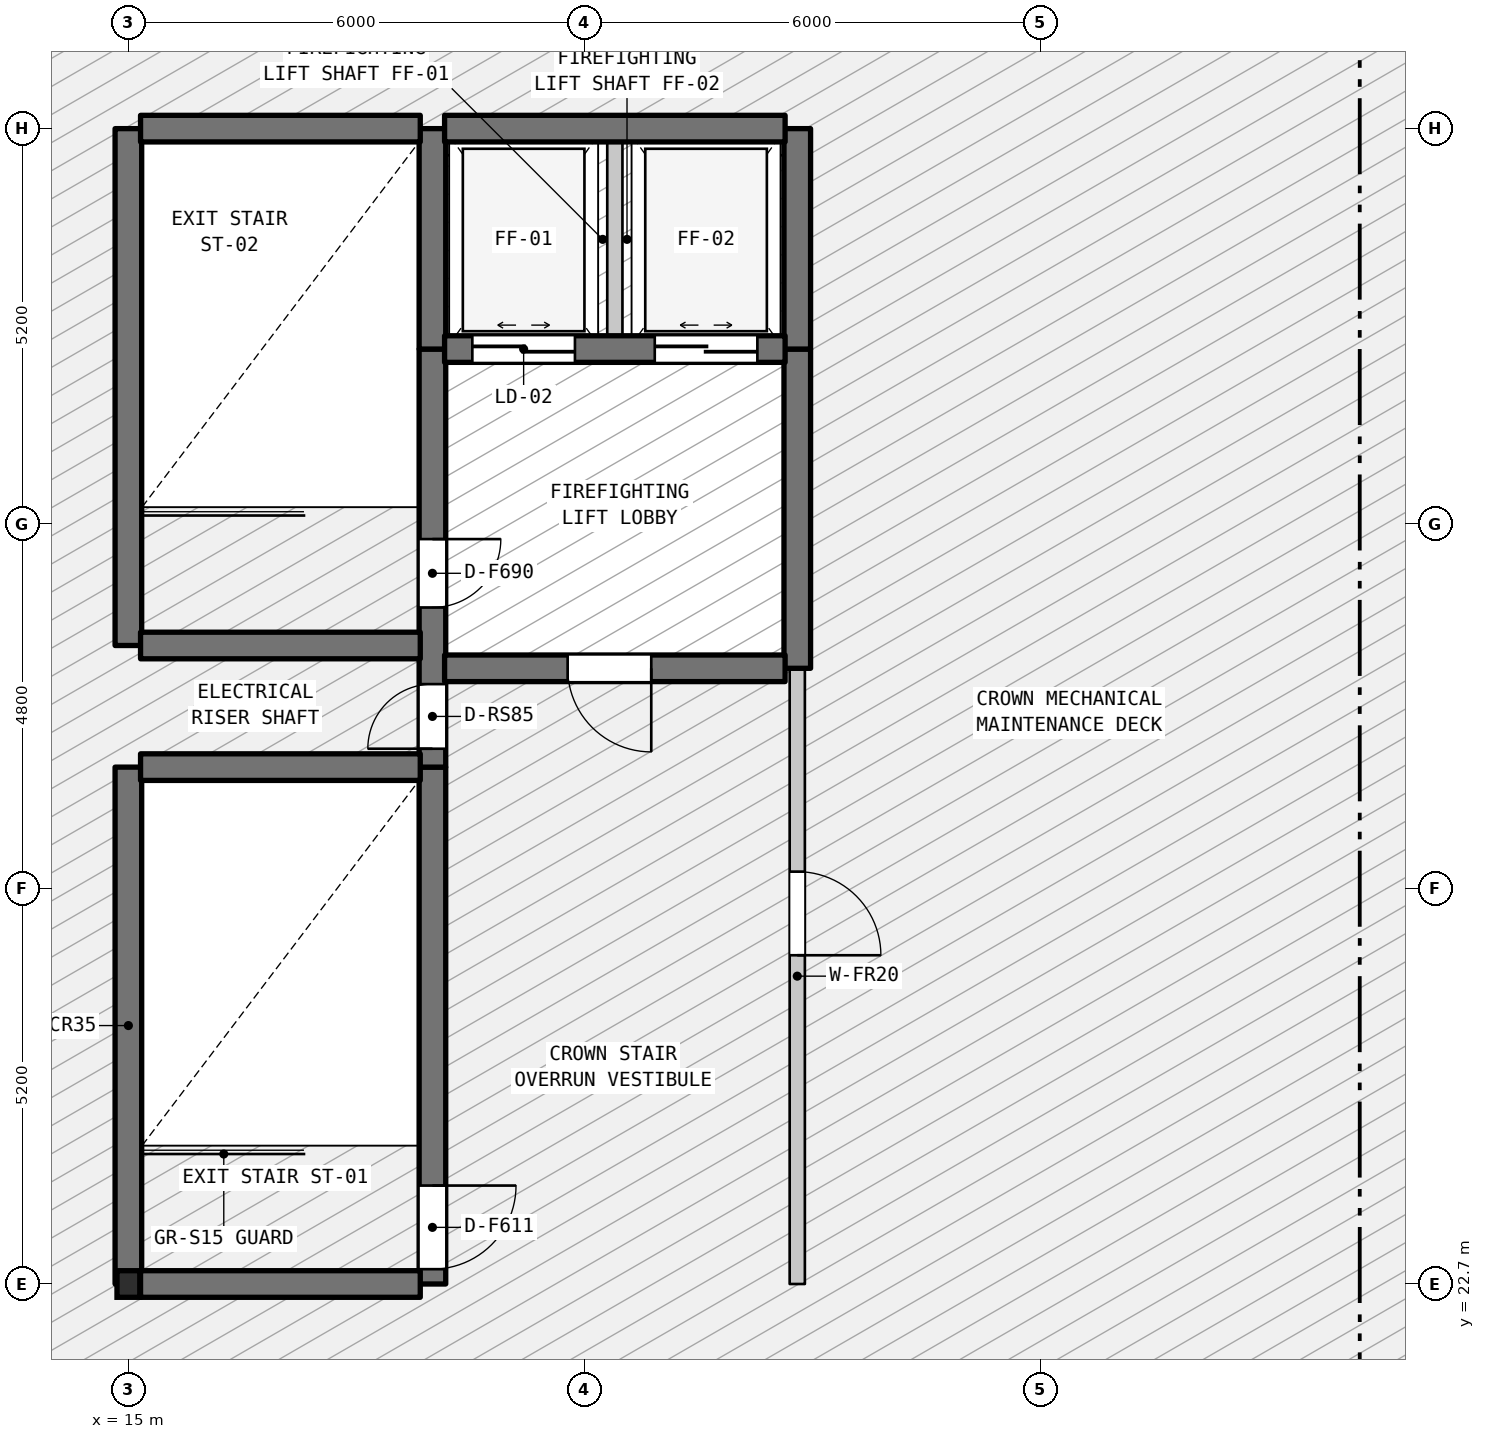
"""IFC4 building model, lengths in metres.
Left out: names, types, materials, properties, quantities, classifications, styles, units other than length and angle.
Written with IfcOpenShell. Run it as: python <this file> out.ifc"""

import sys

from ifc_helpers import new_model, si_unit, direction, frame, frame_2d, origin, origin_2d, place, context, subcontext, project, spatial, rectangle, i_section, extrude, element, fill, save


model = new_model("IFC4")
c1 = context("Model", 3, precision=1e-05, world=origin(), true_north=direction((0.0, 1.0)))
c2 = subcontext(c1, "Body", "Model", "MODEL_VIEW")
j1 = project(units=[si_unit("LENGTHUNIT", "METRE"), si_unit("PLANEANGLEUNIT", "RADIAN")], contexts=[c1])
p1 = place(None, origin())
s1 = spatial("IfcSite", under=j1, at=p1, CompositionType="ELEMENT")
p2 = place(p1, origin())
s2 = spatial("IfcBuilding", under=s1, at=p2, CompositionType="ELEMENT")
p3 = place(p2, frame((0.0, 0.0, 320.0)))
s3 = spatial("IfcBuildingStorey", under=s2, at=p3, CompositionType="ELEMENT", Elevation=320.0)
p4 = place(p3, frame((15.0, 22.7, 0.0), z_axis=(0.0, 0.0, 1.0), x_axis=(1.0, 0.0, 0.0)))
e1 = element("IfcColumn", 1, at=p4, inside=s3, PredefinedType="COLUMN", context=c2, shape_type="SweptSolid", body=[
    extrude(i_section(OverallWidth=0.3, OverallDepth=0.35, WebThickness=0.01, FlangeThickness=0.018, FilletRadius=0.027, at=origin_2d()), origin(), (0.0, 0.0, 1.0), 11.706),
])
p5 = place(p3, frame((15.0, 22.7, 0.0), z_axis=(0.0, 0.0, 1.0), x_axis=(0.0, 1.0, 0.0)))
e2 = element("IfcWall", 2, at=p5, inside=s3, PredefinedType="SHEAR", context=c2, shape_type="SweptSolid", body=[
    extrude(rectangle(XDim=6.8, YDim=0.35, at=frame_2d((3.4, 0.0))), origin(), (0.0, 0.0, 1.0), 3.55),
])
p6 = place(p3, frame((15.0, 31.1, 0.0), z_axis=(0.0, 0.0, 1.0), x_axis=(0.0, 1.0, 0.0)))
e3 = element("IfcWall", 3, at=p6, inside=s3, PredefinedType="SHEAR", context=c2, shape_type="SweptSolid", body=[
    extrude(rectangle(XDim=6.8, YDim=0.35, at=frame_2d((3.4, 0.0))), origin(), (0.0, 0.0, 1.0), 3.55),
])
p7 = place(p3, frame((19.0, 22.7, 0.0), z_axis=(0.0, 0.0, 1.0), x_axis=(0.0, 1.0, 0.0)))
e4 = element("IfcWall", 4, at=p7, inside=s3, PredefinedType="SHEAR", context=c2, shape_type="SweptSolid", body=[
    extrude(rectangle(XDim=6.8, YDim=0.35, at=frame_2d((3.4, 0.0))), origin(), (0.0, 0.0, 1.0), 3.55),
])
p8 = place(p7, frame((0.195, 0.0, 0.0)))
e5 = element("IfcOpeningElement", 5, at=p8, cuts=e4, PredefinedType="OPENING", context=c2, shape_type="SweptSolid", body=[
    extrude(rectangle(XDim=1.1, YDim=2.15, at=frame_2d((0.55, 1.075))), frame((0.0, 0.185, 0.0), z_axis=(0.0, -1.0, 0.0), x_axis=(1.0, 0.0, 0.0)), (0.0, 0.0, 1.0), 0.37),
])
p9 = place(p3, frame((19.0, 29.5, 0.0), z_axis=(0.0, 0.0, 1.0), x_axis=(0.0, 1.0, 0.0)))
e6 = element("IfcWall", 6, at=p9, inside=s3, PredefinedType="SHEAR", context=c2, shape_type="SweptSolid", body=[
    extrude(rectangle(XDim=5.5, YDim=0.35, at=frame_2d((2.75, 0.0))), origin(), (0.0, 0.0, 1.0), 3.55),
])
p10 = place(p9, frame((0.242, 0.0, 0.0)))
e7 = element("IfcOpeningElement", 7, at=p10, cuts=e6, PredefinedType="OPENING", context=c2, shape_type="SweptSolid", body=[
    extrude(rectangle(XDim=0.85, YDim=2.1, at=frame_2d((0.425, 1.05))), frame((0.0, 0.185, 0.0), z_axis=(0.0, -1.0, 0.0), x_axis=(1.0, 0.0, 0.0)), (0.0, 0.0, 1.0), 0.37),
])
p11 = place(p9, frame((2.1, 0.0, 0.0)))
e8 = element("IfcOpeningElement", 8, at=p11, cuts=e6, PredefinedType="OPENING", context=c2, shape_type="SweptSolid", body=[
    extrude(rectangle(XDim=0.9, YDim=2.15, at=frame_2d((0.45, 1.075))), frame((0.0, 0.185, 0.0), z_axis=(0.0, -1.0, 0.0), x_axis=(1.0, 0.0, 0.0)), (0.0, 0.0, 1.0), 0.37),
])
p12 = place(p3, frame((19.0, 35.0, 0.0), z_axis=(0.0, 0.0, 1.0), x_axis=(0.0, 1.0, 0.0)))
e9 = element("IfcWall", 9, at=p12, inside=s3, PredefinedType="SHEAR", context=c2, shape_type="SweptSolid", body=[
    extrude(rectangle(XDim=2.9, YDim=0.35, at=frame_2d((1.45, 0.0))), origin(), (0.0, 0.0, 1.0), 3.55),
])
p13 = place(p3, frame((21.4, 35.0, 0.0), z_axis=(0.0, 0.0, 1.0), x_axis=(0.0, 1.0, 0.0)))
e10 = element("IfcWall", 10, at=p13, inside=s3, PredefinedType="STANDARD", context=c2, shape_type="SweptSolid", body=[
    extrude(rectangle(XDim=2.9, YDim=0.2, at=frame_2d((1.45, 0.0))), origin(), (0.0, 0.0, 1.0), 3.55),
])
p14 = place(p3, frame((23.8, 22.7, 0.0), z_axis=(0.0, 0.0, 1.0), x_axis=(0.0, 1.0, 0.0)))
e11 = element("IfcWall", 11, at=p14, inside=s3, PredefinedType="STANDARD", context=c2, shape_type="SweptSolid", body=[
    extrude(rectangle(XDim=8.1, YDim=0.2, at=frame_2d((4.05, 0.0))), origin(), (0.0, 0.0, 1.0), 3.55),
])
p15 = place(p14, frame((4.325, 0.0, 0.0)))
e12 = element("IfcOpeningElement", 12, at=p15, cuts=e11, PredefinedType="OPENING", context=c2, shape_type="SweptSolid", body=[
    extrude(rectangle(XDim=1.1, YDim=2.15, at=frame_2d((0.55, 1.075))), frame((0.0, 0.11, 0.0), z_axis=(0.0, -1.0, 0.0), x_axis=(1.0, 0.0, 0.0)), (0.0, 0.0, 1.0), 0.22),
])
p16 = place(p3, frame((23.8, 30.8, 0.0), z_axis=(0.0, 0.0, 1.0), x_axis=(0.0, 1.0, 0.0)))
e13 = element("IfcWall", 13, at=p16, inside=s3, PredefinedType="SHEAR", context=c2, shape_type="SweptSolid", body=[
    extrude(rectangle(XDim=4.2, YDim=0.35, at=frame_2d((2.1, 0.0))), origin(), (0.0, 0.0, 1.0), 3.55),
])
p17 = place(p3, frame((23.8, 35.0, 0.0), z_axis=(0.0, 0.0, 1.0), x_axis=(0.0, 1.0, 0.0)))
e14 = element("IfcWall", 14, at=p17, inside=s3, PredefinedType="SHEAR", context=c2, shape_type="SweptSolid", body=[
    extrude(rectangle(XDim=2.9, YDim=0.35, at=frame_2d((1.45, 0.0))), origin(), (0.0, 0.0, 1.0), 3.55),
])
for number, where, z_axis, x_axis in (
    (15, (15.16, 22.7, 0.0), (0.0, 0.0, 1.0), (1.0, 0.0, 0.0)),
    (16, (15.16, 29.5, 0.0), (0.0, 0.0, 1.0), (1.0, 0.0, 0.0)),
):
    element("IfcWall", number, at=place(p3, frame(where, z_axis=z_axis, x_axis=x_axis)), inside=s3, PredefinedType="SHEAR", context=c2, shape_type="SweptSolid", body=[
        extrude(rectangle(XDim=3.68, YDim=0.35, at=frame_2d((1.84, 0.0))), origin(), (0.0, 0.0, 1.0), 3.55),
    ])
p18 = place(p3, frame((19.16, 30.8, 0.0), z_axis=(0.0, 0.0, 1.0), x_axis=(1.0, 0.0, 0.0)))
e17 = element("IfcWall", 17, at=p18, inside=s3, PredefinedType="SHEAR", context=c2, shape_type="SweptSolid", body=[
    extrude(rectangle(XDim=4.48, YDim=0.35, at=frame_2d((2.24, 0.0))), origin(), (0.0, 0.0, 1.0), 3.55),
])
p19 = place(p18, frame((1.619, 0.0, 0.0)))
e18 = element("IfcOpeningElement", 18, at=p19, cuts=e17, PredefinedType="OPENING", context=c2, shape_type="SweptSolid", body=[
    extrude(rectangle(XDim=1.1, YDim=2.15, at=frame_2d((0.55, 1.075))), frame((0.0, 0.185, 0.0), z_axis=(0.0, -1.0, 0.0), x_axis=(1.0, 0.0, 0.0)), (0.0, 0.0, 1.0), 0.37),
])
p20 = place(p3, frame((15.16, 31.1, 0.0), z_axis=(0.0, 0.0, 1.0), x_axis=(1.0, 0.0, 0.0)))
e19 = element("IfcWall", 19, at=p20, inside=s3, PredefinedType="SHEAR", context=c2, shape_type="SweptSolid", body=[
    extrude(rectangle(XDim=3.68, YDim=0.35, at=frame_2d((1.84, 0.0))), origin(), (0.0, 0.0, 1.0), 3.55),
])
p21 = place(p3, frame((19.16, 35.0, 0.0), z_axis=(0.0, 0.0, 1.0), x_axis=(1.0, 0.0, 0.0)))
e20 = element("IfcWall", 20, at=p21, inside=s3, PredefinedType="SHEAR", context=c2, shape_type="SweptSolid", body=[
    extrude(rectangle(XDim=4.48, YDim=0.35, at=frame_2d((2.24, 0.0))), origin(), (0.0, 0.0, 1.0), 3.55),
])
p22 = place(p21, frame((0.365, 0.0, 0.0)))
e21 = element("IfcOpeningElement", 21, at=p22, cuts=e20, PredefinedType="OPENING", context=c2, shape_type="SweptSolid", body=[
    extrude(rectangle(XDim=1.35, YDim=2.2, at=frame_2d((0.675, 1.1))), frame((0.0, 0.185, 0.0), z_axis=(0.0, -1.0, 0.0), x_axis=(1.0, 0.0, 0.0)), (0.0, 0.0, 1.0), 0.37),
])
p23 = place(p21, frame((2.765, 0.0, 0.0)))
e22 = element("IfcOpeningElement", 22, at=p23, cuts=e20, PredefinedType="OPENING", context=c2, shape_type="SweptSolid", body=[
    extrude(rectangle(XDim=1.35, YDim=2.2, at=frame_2d((0.675, 1.1))), frame((0.0, 0.185, 0.0), z_axis=(0.0, -1.0, 0.0), x_axis=(1.0, 0.0, 0.0)), (0.0, 0.0, 1.0), 0.37),
])
p24 = place(p3, frame((15.16, 37.9, 0.0), z_axis=(0.0, 0.0, 1.0), x_axis=(1.0, 0.0, 0.0)))
e23 = element("IfcWall", 23, at=p24, inside=s3, PredefinedType="SHEAR", context=c2, shape_type="SweptSolid", body=[
    extrude(rectangle(XDim=3.68, YDim=0.35, at=frame_2d((1.84, 0.0))), origin(), (0.0, 0.0, 1.0), 3.55),
])
p25 = place(p3, frame((19.16, 37.9, 0.0), z_axis=(0.0, 0.0, 1.0), x_axis=(1.0, 0.0, 0.0)))
e24 = element("IfcWall", 24, at=p25, inside=s3, PredefinedType="SHEAR", context=c2, shape_type="SweptSolid", body=[
    extrude(rectangle(XDim=4.48, YDim=0.35, at=frame_2d((2.24, 0.0))), origin(), (0.0, 0.0, 1.0), 3.55),
])
p26 = place(p8, frame((1.1, 0.0, 0.0), z_axis=(0.0, 0.0, 1.0), x_axis=(-1.0, 0.0, 0.0)))
e25 = element("IfcDoor", 25, at=p26, inside=s3, OperationType="SINGLE_SWING_RIGHT", PredefinedType="DOOR", context=c2, shape_type="SweptSolid", body=[
    extrude(rectangle(XDim=1.1, YDim=2.15, at=frame_2d((0.55, 1.075))), frame((0.0, 0.025, 0.0), z_axis=(0.0, -1.0, 0.0), x_axis=(1.0, 0.0, 0.0)), (0.0, 0.0, 1.0), 0.05),
])
fill(e5, e25)
p27 = place(p10, origin())
e26 = element("IfcDoor", 26, at=p27, inside=s3, OperationType="SINGLE_SWING_LEFT", PredefinedType="DOOR", context=c2, shape_type="SweptSolid", body=[
    extrude(rectangle(XDim=0.85, YDim=2.1, at=frame_2d((0.425, 1.05))), frame((0.0, 0.025, 0.0), z_axis=(0.0, -1.0, 0.0), x_axis=(1.0, 0.0, 0.0)), (0.0, 0.0, 1.0), 0.05),
])
fill(e7, e26)
p28 = place(p11, frame((0.9, 0.0, 0.0), z_axis=(0.0, 0.0, 1.0), x_axis=(-1.0, 0.0, 0.0)))
e27 = element("IfcDoor", 27, at=p28, inside=s3, OperationType="SINGLE_SWING_RIGHT", PredefinedType="DOOR", context=c2, shape_type="SweptSolid", body=[
    extrude(rectangle(XDim=0.9, YDim=2.15, at=frame_2d((0.45, 1.075))), frame((0.0, 0.025, 0.0), z_axis=(0.0, -1.0, 0.0), x_axis=(1.0, 0.0, 0.0)), (0.0, 0.0, 1.0), 0.05),
])
fill(e8, e27)
p29 = place(p15, frame((1.1, 0.0, 0.0), z_axis=(0.0, 0.0, 1.0), x_axis=(-1.0, 0.0, 0.0)))
e28 = element("IfcDoor", 28, at=p29, inside=s3, OperationType="SINGLE_SWING_LEFT", PredefinedType="DOOR", context=c2, shape_type="SweptSolid", body=[
    extrude(rectangle(XDim=1.1, YDim=2.15, at=frame_2d((0.55, 1.075))), frame((0.0, 0.025, 0.0), z_axis=(0.0, -1.0, 0.0), x_axis=(1.0, 0.0, 0.0)), (0.0, 0.0, 1.0), 0.05),
])
fill(e12, e28)
p30 = place(p19, frame((1.1, 0.0, 0.0), z_axis=(0.0, 0.0, 1.0), x_axis=(-1.0, 0.0, 0.0)))
e29 = element("IfcDoor", 29, at=p30, inside=s3, OperationType="SINGLE_SWING_RIGHT", PredefinedType="DOOR", context=c2, shape_type="SweptSolid", body=[
    extrude(rectangle(XDim=1.1, YDim=2.15, at=frame_2d((0.55, 1.075))), frame((0.0, 0.025, 0.0), z_axis=(0.0, -1.0, 0.0), x_axis=(1.0, 0.0, 0.0)), (0.0, 0.0, 1.0), 0.05),
])
fill(e18, e29)
p31 = place(p22, origin())
e30 = element("IfcDoor", 30, at=p31, inside=s3, OperationType="DOUBLE_DOOR_SLIDING", PredefinedType="DOOR", context=c2, shape_type="SweptSolid", body=[
    extrude(rectangle(XDim=1.35, YDim=2.2, at=frame_2d((0.675, 1.1))), frame((0.0, 0.025, 0.0), z_axis=(0.0, -1.0, 0.0), x_axis=(1.0, 0.0, 0.0)), (0.0, 0.0, 1.0), 0.05),
])
fill(e21, e30)
p32 = place(p23, origin())
e31 = element("IfcDoor", 31, at=p32, inside=s3, OperationType="DOUBLE_DOOR_SLIDING", PredefinedType="DOOR", context=c2, shape_type="SweptSolid", body=[
    extrude(rectangle(XDim=1.35, YDim=2.2, at=frame_2d((0.675, 1.1))), frame((0.0, 0.025, 0.0), z_axis=(0.0, -1.0, 0.0), x_axis=(1.0, 0.0, 0.0)), (0.0, 0.0, 1.0), 0.05),
])
fill(e22, e31)
save(model, sys.argv[1])
